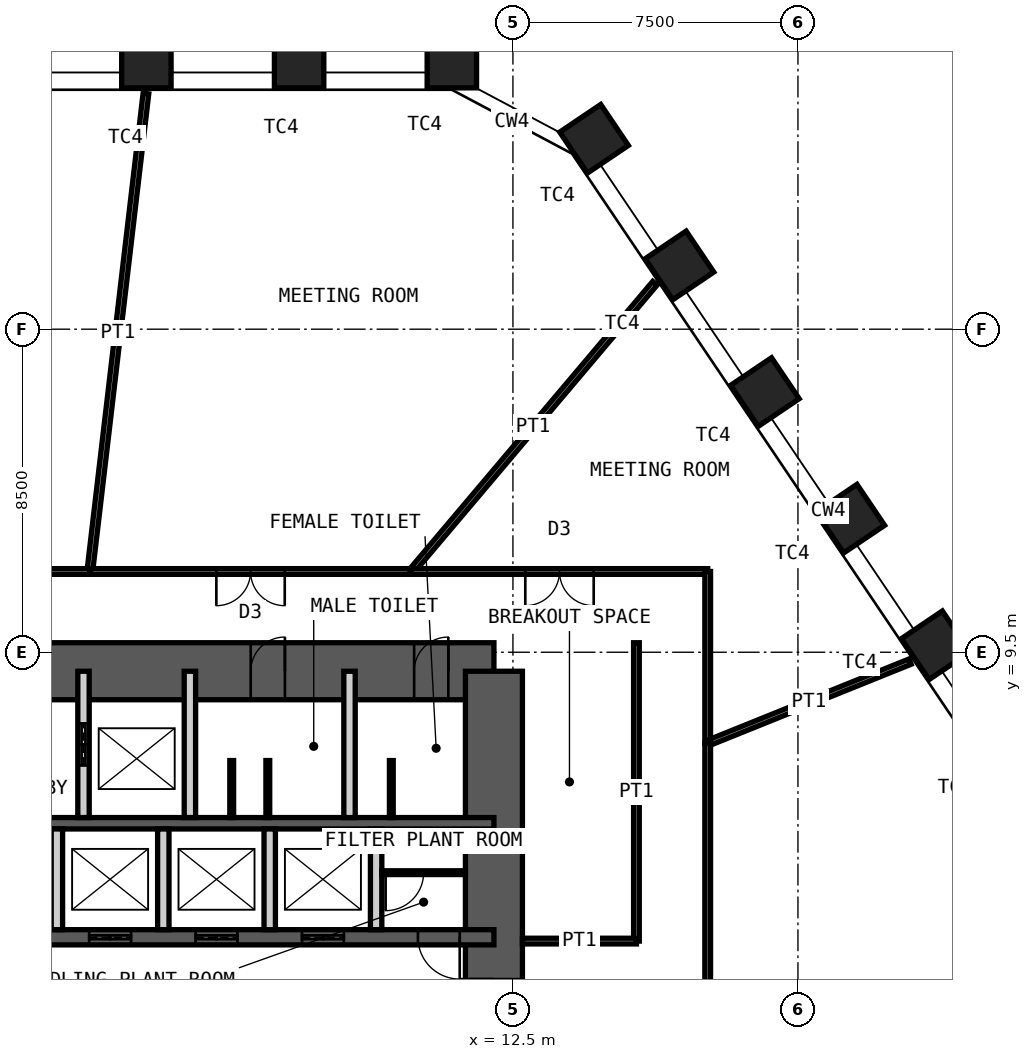
"""IFC4 building model, lengths in metres.
Left out: names, types, materials, properties, quantities, classifications, styles, units other than length and angle.
Written with IfcOpenShell. Run it as: python <this file> out.ifc"""

import sys

from ifc_helpers import new_model, si_unit, direction, frame, frame_2d, origin, origin_2d, place, context, subcontext, project, spatial, rectangle, hollow_rectangle, extrude, element, fill, save


model = new_model("IFC4")
c1 = context("Model", 3, precision=1e-05, world=origin(), true_north=direction((0.0, 1.0)))
c2 = subcontext(c1, "Body", "Model", "MODEL_VIEW")
j1 = project(units=[si_unit("LENGTHUNIT", "METRE"), si_unit("PLANEANGLEUNIT", "RADIAN")], contexts=[c1])
p1 = place(None, origin())
s1 = spatial("IfcSite", under=j1, at=p1, CompositionType="ELEMENT")
p2 = place(p1, origin())
s2 = spatial("IfcBuilding", under=s1, at=p2, CompositionType="ELEMENT")
p3 = place(p2, frame((0.0, 0.0, 161.8)))
s3 = spatial("IfcBuildingStorey", under=s2, at=p3, CompositionType="ELEMENT", Elevation=161.8)
for number, where, z_axis, x_axis in (
    (1, (2.854, 25.0, 0.0), (0.0, 0.0, 1.0), (-1.0, 0.0, 0.0)),
    (2, (6.874, 25.0, 0.0), (0.0, 0.0, 1.0), (-1.0, 0.0, 0.0)),
    (3, (10.893, 25.0, 0.0), (0.0, 0.0, 1.0), (-1.0, 0.0, 0.0)),
    (4, (14.635, 23.01, 0.0), (0.0, 0.0, 1.0), (-0.559, 0.829, 0.0)),
    (5, (16.882, 19.678, 0.0), (0.0, 0.0, 1.0), (-0.559, 0.829, 0.0)),
    (6, (19.13, 16.346, 0.0), (0.0, 0.0, 1.0), (-0.559, 0.829, 0.0)),
    (7, (21.377, 13.014, 0.0), (0.0, 0.0, 1.0), (-0.559, 0.829, 0.0)),
    (8, (23.625, 9.682, 0.0), (0.0, 0.0, 1.0), (-0.559, 0.829, 0.0)),
):
    element("IfcColumn", number, at=place(p3, frame(where, z_axis=z_axis, x_axis=x_axis)), inside=s3, PredefinedType="COLUMN", context=c2, shape_type="SweptSolid", body=[
        extrude(hollow_rectangle(XDim=1.3, YDim=1.3, WallThickness=0.1, at=origin_2d()), origin(), (0.0, 0.0, 1.0), 4.2),
    ])
p4 = place(p3, frame((-12.0, 9.0, 0.0), z_axis=(0.0, 0.0, 1.0), x_axis=(1.0, 0.0, 0.0)))
e9 = element("IfcWall", 9, at=p4, inside=s3, PredefinedType="SHEAR", context=c2, shape_type="SweptSolid", body=[
    extrude(rectangle(XDim=24.0, YDim=1.5, at=frame_2d((12.0, 0.0))), origin(), (0.0, 0.0, 1.0), 4.2),
])
p5 = place(p4, frame((10.4, 0.0, 0.0)))
e10 = element("IfcOpeningElement", 10, at=p5, cuts=e9, PredefinedType="OPENING", context=c2, shape_type="SweptSolid", body=[
    extrude(rectangle(XDim=1.0, YDim=2.1, at=frame_2d((0.5, 1.05))), frame((0.0, 0.76, 0.0), z_axis=(0.0, -1.0, 0.0), x_axis=(1.0, 0.0, 0.0)), (0.0, 0.0, 1.0), 1.52),
])
p6 = place(p4, frame((17.6, 0.0, 0.0)))
e11 = element("IfcOpeningElement", 11, at=p6, cuts=e9, PredefinedType="OPENING", context=c2, shape_type="SweptSolid", body=[
    extrude(rectangle(XDim=0.9, YDim=2.1, at=frame_2d((0.45, 1.05))), frame((0.0, 0.76, 0.0), z_axis=(0.0, -1.0, 0.0), x_axis=(1.0, 0.0, 0.0)), (0.0, 0.0, 1.0), 1.52),
])
p7 = place(p4, frame((21.9, 0.0, 0.0)))
e12 = element("IfcOpeningElement", 12, at=p7, cuts=e9, PredefinedType="OPENING", context=c2, shape_type="SweptSolid", body=[
    extrude(rectangle(XDim=0.9, YDim=2.1, at=frame_2d((0.45, 1.05))), frame((0.0, 0.76, 0.0), z_axis=(0.0, -1.0, 0.0), x_axis=(1.0, 0.0, 0.0)), (0.0, 0.0, 1.0), 1.52),
])
p8 = place(p3, frame((12.0, -9.0, 0.0), z_axis=(0.0, 0.0, 1.0), x_axis=(0.0, 1.0, 0.0)))
e13 = element("IfcWall", 13, at=p8, inside=s3, PredefinedType="SHEAR", context=c2, shape_type="SweptSolid", body=[
    extrude(rectangle(XDim=18.0, YDim=1.5, at=frame_2d((9.0, 0.0))), origin(), (0.0, 0.0, 1.0), 4.2),
])
p9 = place(p8, frame((8.1, 0.0, 0.0)))
e14 = element("IfcOpeningElement", 14, at=p9, cuts=e13, PredefinedType="OPENING", context=c2, shape_type="SweptSolid", body=[
    extrude(rectangle(XDim=1.8, YDim=2.1, at=frame_2d((0.9, 1.05))), frame((0.0, 0.76, 0.0), z_axis=(0.0, -1.0, 0.0), x_axis=(1.0, 0.0, 0.0)), (0.0, 0.0, 1.0), 1.52),
])
p10 = place(p3, frame((-12.0, 5.0, 0.0), z_axis=(0.0, 0.0, 1.0), x_axis=(1.0, 0.0, 0.0)))
e15 = element("IfcWall", 15, at=p10, inside=s3, PredefinedType="SHEAR", context=c2, shape_type="SweptSolid", body=[
    extrude(rectangle(XDim=24.0, YDim=0.3, at=frame_2d((12.0, 0.0))), origin(), (0.0, 0.0, 1.0), 4.2),
])
p11 = place(p3, frame((-12.0, 2.0, 0.0), z_axis=(0.0, 0.0, 1.0), x_axis=(1.0, 0.0, 0.0)))
e16 = element("IfcWall", 16, at=p11, inside=s3, PredefinedType="SHEAR", context=c2, shape_type="SweptSolid", body=[
    extrude(rectangle(XDim=24.0, YDim=0.4, at=frame_2d((12.0, 0.0))), origin(), (0.0, 0.0, 1.0), 4.2),
])
p12 = place(p11, frame((2.4, 0.0, 0.0)))
e17 = element("IfcOpeningElement", 17, at=p12, cuts=e16, PredefinedType="OPENING", context=c2, shape_type="SweptSolid", body=[
    extrude(rectangle(XDim=1.1, YDim=2.1, at=frame_2d((0.55, 1.05))), frame((0.0, 0.21, 0.0), z_axis=(0.0, -1.0, 0.0), x_axis=(1.0, 0.0, 0.0)), (0.0, 0.0, 1.0), 0.42),
])
p13 = place(p11, frame((22.0, 0.0, 0.0)))
e18 = element("IfcOpeningElement", 18, at=p13, cuts=e16, PredefinedType="OPENING", context=c2, shape_type="SweptSolid", body=[
    extrude(rectangle(XDim=1.1, YDim=2.1, at=frame_2d((0.55, 1.05))), frame((0.0, 0.21, 0.0), z_axis=(0.0, -1.0, 0.0), x_axis=(1.0, 0.0, 0.0)), (0.0, 0.0, 1.0), 0.42),
])
p14 = place(p11, frame((10.15, 0.0, 0.0)))
e19 = element("IfcOpeningElement", 19, at=p14, cuts=e16, PredefinedType="OPENING", context=c2, shape_type="SweptSolid", body=[
    extrude(rectangle(XDim=1.0, YDim=2.1, at=frame_2d((0.5, 1.05))), frame((0.0, 0.21, 0.0), z_axis=(0.0, -1.0, 0.0), x_axis=(1.0, 0.0, 0.0)), (0.0, 0.0, 1.0), 0.42),
])
p15 = place(p11, frame((6.9, 0.0, 0.0)))
e20 = element("IfcOpeningElement", 20, at=p15, cuts=e16, PredefinedType="OPENING", context=c2, shape_type="SweptSolid", body=[
    extrude(rectangle(XDim=1.0, YDim=2.1, at=frame_2d((0.5, 1.05))), frame((0.0, 0.21, 0.0), z_axis=(0.0, -1.0, 0.0), x_axis=(1.0, 0.0, 0.0)), (0.0, 0.0, 1.0), 0.42),
])
p16 = place(p11, frame((13.35, 0.0, 0.0)))
e21 = element("IfcOpeningElement", 21, at=p16, cuts=e16, PredefinedType="OPENING", context=c2, shape_type="SweptSolid", body=[
    extrude(rectangle(XDim=1.1, YDim=2.4, at=frame_2d((0.55, 1.2))), frame((0.0, 0.21, 0.0), z_axis=(0.0, -1.0, 0.0), x_axis=(1.0, 0.0, 0.0)), (0.0, 0.0, 1.0), 0.42),
])
p17 = place(p11, frame((16.15, 0.0, 0.0)))
e22 = element("IfcOpeningElement", 22, at=p17, cuts=e16, PredefinedType="OPENING", context=c2, shape_type="SweptSolid", body=[
    extrude(rectangle(XDim=1.1, YDim=2.4, at=frame_2d((0.55, 1.2))), frame((0.0, 0.21, 0.0), z_axis=(0.0, -1.0, 0.0), x_axis=(1.0, 0.0, 0.0)), (0.0, 0.0, 1.0), 0.42),
])
p18 = place(p11, frame((18.95, 0.0, 0.0)))
e23 = element("IfcOpeningElement", 23, at=p18, cuts=e16, PredefinedType="OPENING", context=c2, shape_type="SweptSolid", body=[
    extrude(rectangle(XDim=1.1, YDim=2.4, at=frame_2d((0.55, 1.2))), frame((0.0, 0.21, 0.0), z_axis=(0.0, -1.0, 0.0), x_axis=(1.0, 0.0, 0.0)), (0.0, 0.0, 1.0), 0.42),
])
p19 = place(p3, frame((1.2, 5.15, 0.0), z_axis=(0.0, 0.0, 1.0), x_axis=(0.0, 1.0, 0.0)))
e24 = element("IfcWall", 24, at=p19, inside=s3, PredefinedType="PARTITIONING", context=c2, shape_type="SweptSolid", body=[
    extrude(rectangle(XDim=3.85, YDim=0.3, at=frame_2d((1.925, 0.0))), origin(), (0.0, 0.0, 1.0), 3.98),
])
p20 = place(p19, frame((1.375, 0.0, 0.0)))
e25 = element("IfcOpeningElement", 25, at=p20, cuts=e24, PredefinedType="OPENING", context=c2, shape_type="SweptSolid", body=[
    extrude(rectangle(XDim=1.1, YDim=2.4, at=frame_2d((0.55, 1.2))), frame((0.0, 0.16, 0.0), z_axis=(0.0, -1.0, 0.0), x_axis=(1.0, 0.0, 0.0)), (0.0, 0.0, 1.0), 0.32),
])
for number, where, z_axis, x_axis in (
    (26, (4.0, 5.15, 0.0), (0.0, 0.0, 1.0), (0.0, 1.0, 0.0)),
    (27, (8.2, 5.15, 0.0), (0.0, 0.0, 1.0), (0.0, 1.0, 0.0)),
):
    element("IfcWall", number, at=place(p3, frame(where, z_axis=z_axis, x_axis=x_axis)), inside=s3, PredefinedType="PARTITIONING", context=c2, shape_type="SweptSolid", body=[
        extrude(rectangle(XDim=3.85, YDim=0.3, at=frame_2d((1.925, 0.0))), origin(), (0.0, 0.0, 1.0), 3.98),
    ])
for number, where, z_axis, x_axis in (
    (28, (0.5, 2.2, 0.0), (0.0, 0.0, 1.0), (0.0, 1.0, 0.0)),
    (29, (3.3, 2.2, 0.0), (0.0, 0.0, 1.0), (0.0, 1.0, 0.0)),
    (30, (6.1, 2.2, 0.0), (0.0, 0.0, 1.0), (0.0, 1.0, 0.0)),
    (31, (8.9, 2.2, 0.0), (0.0, 0.0, 1.0), (0.0, 1.0, 0.0)),
):
    element("IfcWall", number, at=place(p3, frame(where, z_axis=z_axis, x_axis=x_axis)), inside=s3, PredefinedType="PARTITIONING", context=c2, shape_type="SweptSolid", body=[
        extrude(rectangle(XDim=2.65, YDim=0.3, at=frame_2d((1.325, 0.0))), origin(), (0.0, 0.0, 1.0), 3.98),
    ])
p21 = place(p3, frame((9.05, 3.7, 0.0), z_axis=(0.0, 0.0, 1.0), x_axis=(1.0, 0.0, 0.0)))
e32 = element("IfcWall", 32, at=p21, inside=s3, PredefinedType="PARTITIONING", context=c2, shape_type="SweptSolid", body=[
    extrude(rectangle(XDim=2.2, YDim=0.1, at=frame_2d((1.1, 0.0))), origin(), (0.0, 0.0, 1.0), 3.98),
])
p22 = place(p21, frame((0.1, 0.0, 0.0)))
e33 = element("IfcOpeningElement", 33, at=p22, cuts=e32, PredefinedType="OPENING", context=c2, shape_type="SweptSolid", body=[
    extrude(rectangle(XDim=1.0, YDim=2.4, at=frame_2d((0.5, 1.2))), frame((0.0, 0.06, 0.0), z_axis=(0.0, -1.0, 0.0), x_axis=(1.0, 0.0, 0.0)), (0.0, 0.0, 1.0), 0.12),
])
for number, where, z_axis, x_axis in (
    (34, (5.1, 5.15, 0.0), (0.0, 0.0, 1.0), (0.0, 1.0, 0.0)),
    (35, (6.05, 5.15, 0.0), (0.0, 0.0, 1.0), (0.0, 1.0, 0.0)),
    (36, (9.3, 5.15, 0.0), (0.0, 0.0, 1.0), (0.0, 1.0, 0.0)),
):
    element("IfcWall", number, at=place(p3, frame(where, z_axis=z_axis, x_axis=x_axis)), inside=s3, PredefinedType="PARTITIONING", context=c2, shape_type="SweptSolid", body=[
        extrude(rectangle(XDim=1.5, YDim=0.1, at=frame_2d((0.75, 0.0))), origin(), (0.0, 0.0, 1.0), 2.1),
    ])
p23 = place(p3, frame((2.843, 24.201, 0.0), z_axis=(0.0, 0.0, 1.0), x_axis=(-0.116670084723, -0.993170726175, 0.0)))
e37 = element("IfcWall", 37, at=p23, inside=s3, PredefinedType="PARTITIONING", context=c2, shape_type="SweptSolid", body=[
    extrude(rectangle(XDim=12.662, YDim=0.15, at=frame_2d((6.331, 0.0))), origin(), (0.0, 0.0, 1.0), 3.28),
])
p24 = place(p3, frame((1.366, 11.625, 0.0), z_axis=(0.0, 0.0, 1.0), x_axis=(1.0, 0.0, 0.0)))
e38 = element("IfcWall", 38, at=p24, inside=s3, PredefinedType="PARTITIONING", context=c2, shape_type="SweptSolid", body=[
    extrude(rectangle(XDim=8.46, YDim=0.15, at=frame_2d((4.23, 0.0))), origin(), (0.0, 0.0, 1.0), 4.03),
])
p25 = place(p24, frame((3.33, 0.0, 0.0)))
e39 = element("IfcOpeningElement", 39, at=p25, cuts=e38, PredefinedType="OPENING", context=c2, shape_type="SweptSolid", body=[
    extrude(rectangle(XDim=1.8, YDim=2.4, at=frame_2d((0.9, 1.2))), frame((0.0, 0.085, 0.0), z_axis=(0.0, -1.0, 0.0), x_axis=(1.0, 0.0, 0.0)), (0.0, 0.0, 1.0), 0.17),
])
p26 = place(p3, frame((16.237, 19.21, 0.0), z_axis=(0.0, 0.0, 1.0), x_axis=(-0.645526723652, -0.763737683404, 0.0)))
e40 = element("IfcWall", 40, at=p26, inside=s3, PredefinedType="PARTITIONING", context=c2, shape_type="SweptSolid", body=[
    extrude(rectangle(XDim=9.932, YDim=0.15, at=frame_2d((4.966, 0.0))), origin(), (0.0, 0.0, 1.0), 3.28),
])
p27 = place(p3, frame((9.826, 11.625, 0.0), z_axis=(0.0, 0.0, 1.0), x_axis=(1.0, 0.0, 0.0)))
e41 = element("IfcWall", 41, at=p27, inside=s3, PredefinedType="PARTITIONING", context=c2, shape_type="SweptSolid", body=[
    extrude(rectangle(XDim=7.799, YDim=0.15, at=frame_2d((3.899, 0.0))), origin(), (0.0, 0.0, 1.0), 4.03),
])
p28 = place(p27, frame((3.0, 0.0, 0.0)))
e42 = element("IfcOpeningElement", 42, at=p28, cuts=e41, PredefinedType="OPENING", context=c2, shape_type="SweptSolid", body=[
    extrude(rectangle(XDim=1.8, YDim=2.4, at=frame_2d((0.9, 1.2))), frame((0.0, 0.085, 0.0), z_axis=(0.0, -1.0, 0.0), x_axis=(1.0, 0.0, 0.0)), (0.0, 0.0, 1.0), 0.17),
])
p29 = place(p3, frame((17.625, 11.625, 0.0), z_axis=(0.0, 0.0, 1.0), x_axis=(0.0, -1.0, 0.0)))
e43 = element("IfcWall", 43, at=p29, inside=s3, PredefinedType="PARTITIONING", context=c2, shape_type="SweptSolid", body=[
    extrude(rectangle(XDim=4.519, YDim=0.15, at=frame_2d((2.26, 0.0))), origin(), (0.0, 0.0, 1.0), 4.03),
])
p30 = place(p3, frame((22.951, 9.254, 0.0), z_axis=(0.0, 0.0, 1.0), x_axis=(-0.927444087873, -0.373961848147, 0.0)))
e44 = element("IfcWall", 44, at=p30, inside=s3, PredefinedType="PARTITIONING", context=c2, shape_type="SweptSolid", body=[
    extrude(rectangle(XDim=5.743, YDim=0.15, at=frame_2d((2.872, 0.0))), origin(), (0.0, 0.0, 1.0), 3.28),
])
p31 = place(p3, frame((17.625, 7.106, 0.0), z_axis=(0.0, 0.0, 1.0), x_axis=(0.0, -1.0, 0.0)))
e45 = element("IfcWall", 45, at=p31, inside=s3, PredefinedType="PARTITIONING", context=c2, shape_type="SweptSolid", body=[
    extrude(rectangle(XDim=18.731, YDim=0.15, at=frame_2d((9.365, 0.0))), origin(), (0.0, 0.0, 1.0), 4.03),
])
p32 = place(p31, frame((8.466, 0.0, 0.0)))
e46 = element("IfcOpeningElement", 46, at=p32, cuts=e45, PredefinedType="OPENING", context=c2, shape_type="SweptSolid", body=[
    extrude(rectangle(XDim=1.8, YDim=2.4, at=frame_2d((0.9, 1.2))), frame((0.0, 0.085, 0.0), z_axis=(0.0, -1.0, 0.0), x_axis=(1.0, 0.0, 0.0)), (0.0, 0.0, 1.0), 0.17),
])
p33 = place(p3, frame((-4.403, 11.625, 0.0), z_axis=(0.0, 0.0, 1.0), x_axis=(1.0, 0.0, 0.0)))
e47 = element("IfcWall", 47, at=p33, inside=s3, PredefinedType="PARTITIONING", context=c2, shape_type="SweptSolid", body=[
    extrude(rectangle(XDim=5.768, YDim=0.15, at=frame_2d((2.884, 0.0))), origin(), (0.0, 0.0, 1.0), 4.03),
])
p34 = place(p33, frame((1.984, 0.0, 0.0)))
e48 = element("IfcOpeningElement", 48, at=p34, cuts=e47, PredefinedType="OPENING", context=c2, shape_type="SweptSolid", body=[
    extrude(rectangle(XDim=1.8, YDim=2.4, at=frame_2d((0.9, 1.2))), frame((0.0, 0.085, 0.0), z_axis=(0.0, -1.0, 0.0), x_axis=(1.0, 0.0, 0.0)), (0.0, 0.0, 1.0), 0.17),
])
p35 = place(p3, frame((15.75, 1.9, 0.0), z_axis=(0.0, 0.0, 1.0), x_axis=(0.0, 1.0, 0.0)))
e49 = element("IfcWall", 49, at=p35, inside=s3, PredefinedType="PARTITIONING", context=c2, shape_type="SweptSolid", body=[
    extrude(rectangle(XDim=7.85, YDim=0.15, at=frame_2d((3.925, 0.0))), origin(), (0.0, 0.0, 1.0), 4.03),
])
p36 = place(p3, frame((12.75, 1.9, 0.0), z_axis=(0.0, 0.0, 1.0), x_axis=(1.0, 0.0, 0.0)))
e50 = element("IfcWall", 50, at=p36, inside=s3, PredefinedType="PARTITIONING", context=c2, shape_type="SweptSolid", body=[
    extrude(rectangle(XDim=3.0, YDim=0.15, at=frame_2d((1.5, 0.0))), origin(), (0.0, 0.0, 1.0), 2.93),
])
p37 = place(p6, origin())
e51 = element("IfcDoor", 51, at=p37, inside=s3, OperationType="SINGLE_SWING_LEFT", PredefinedType="DOOR", context=c2, shape_type="SweptSolid", body=[
    extrude(rectangle(XDim=0.9, YDim=2.1, at=frame_2d((0.45, 1.05))), frame((0.0, 0.025, 0.0), z_axis=(0.0, -1.0, 0.0), x_axis=(1.0, 0.0, 0.0)), (0.0, 0.0, 1.0), 0.05),
])
fill(e11, e51)
p38 = place(p7, origin())
e52 = element("IfcDoor", 52, at=p38, inside=s3, OperationType="SINGLE_SWING_LEFT", PredefinedType="DOOR", context=c2, shape_type="SweptSolid", body=[
    extrude(rectangle(XDim=0.9, YDim=2.1, at=frame_2d((0.45, 1.05))), frame((0.0, 0.025, 0.0), z_axis=(0.0, -1.0, 0.0), x_axis=(1.0, 0.0, 0.0)), (0.0, 0.0, 1.0), 0.05),
])
fill(e12, e52)
p39 = place(p13, origin())
e53 = element("IfcDoor", 53, at=p39, inside=s3, OperationType="SINGLE_SWING_RIGHT", PredefinedType="DOOR", context=c2, shape_type="SweptSolid", body=[
    extrude(rectangle(XDim=1.1, YDim=2.1, at=frame_2d((0.55, 1.05))), frame((0.0, 0.025, 0.0), z_axis=(0.0, -1.0, 0.0), x_axis=(1.0, 0.0, 0.0)), (0.0, 0.0, 1.0), 0.05),
])
fill(e18, e53)
p40 = place(p9, origin())
e54 = element("IfcDoor", 54, at=p40, inside=s3, OperationType="DOUBLE_DOOR_DOUBLE_SWING", PredefinedType="DOOR", context=c2, shape_type="SweptSolid", body=[
    extrude(rectangle(XDim=1.8, YDim=2.1, at=frame_2d((0.9, 1.05))), frame((0.0, 0.025, 0.0), z_axis=(0.0, -1.0, 0.0), x_axis=(1.0, 0.0, 0.0)), (0.0, 0.0, 1.0), 0.05),
])
fill(e14, e54)
p41 = place(p20, origin())
e55 = element("IfcDoor", 55, at=p41, inside=s3, OperationType="DOUBLE_DOOR_SLIDING", PredefinedType="DOOR", context=c2, shape_type="SweptSolid", body=[
    extrude(rectangle(XDim=1.1, YDim=2.4, at=frame_2d((0.55, 1.2))), frame((0.0, 0.025, 0.0), z_axis=(0.0, -1.0, 0.0), x_axis=(1.0, 0.0, 0.0)), (0.0, 0.0, 1.0), 0.05),
])
fill(e25, e55)
p42 = place(p16, origin())
e56 = element("IfcDoor", 56, at=p42, inside=s3, OperationType="DOUBLE_DOOR_SLIDING", PredefinedType="DOOR", context=c2, shape_type="SweptSolid", body=[
    extrude(rectangle(XDim=1.1, YDim=2.4, at=frame_2d((0.55, 1.2))), frame((0.0, 0.025, 0.0), z_axis=(0.0, -1.0, 0.0), x_axis=(1.0, 0.0, 0.0)), (0.0, 0.0, 1.0), 0.05),
])
fill(e21, e56)
p43 = place(p17, origin())
e57 = element("IfcDoor", 57, at=p43, inside=s3, OperationType="DOUBLE_DOOR_SLIDING", PredefinedType="DOOR", context=c2, shape_type="SweptSolid", body=[
    extrude(rectangle(XDim=1.1, YDim=2.4, at=frame_2d((0.55, 1.2))), frame((0.0, 0.025, 0.0), z_axis=(0.0, -1.0, 0.0), x_axis=(1.0, 0.0, 0.0)), (0.0, 0.0, 1.0), 0.05),
])
fill(e22, e57)
p44 = place(p18, origin())
e58 = element("IfcDoor", 58, at=p44, inside=s3, OperationType="DOUBLE_DOOR_SLIDING", PredefinedType="DOOR", context=c2, shape_type="SweptSolid", body=[
    extrude(rectangle(XDim=1.1, YDim=2.4, at=frame_2d((0.55, 1.2))), frame((0.0, 0.025, 0.0), z_axis=(0.0, -1.0, 0.0), x_axis=(1.0, 0.0, 0.0)), (0.0, 0.0, 1.0), 0.05),
])
fill(e23, e58)
p45 = place(p22, origin())
e59 = element("IfcDoor", 59, at=p45, inside=s3, OperationType="SINGLE_SWING_LEFT", PredefinedType="DOOR", context=c2, shape_type="SweptSolid", body=[
    extrude(rectangle(XDim=1.0, YDim=2.4, at=frame_2d((0.5, 1.2))), frame((0.0, 0.025, 0.0), z_axis=(0.0, -1.0, 0.0), x_axis=(1.0, 0.0, 0.0)), (0.0, 0.0, 1.0), 0.05),
])
fill(e33, e59)
p46 = place(p25, origin())
e60 = element("IfcDoor", 60, at=p46, inside=s3, OperationType="DOUBLE_DOOR_DOUBLE_SWING", PredefinedType="DOOR", context=c2, shape_type="SweptSolid", body=[
    extrude(rectangle(XDim=1.8, YDim=2.4, at=frame_2d((0.9, 1.2))), frame((0.0, 0.025, 0.0), z_axis=(0.0, -1.0, 0.0), x_axis=(1.0, 0.0, 0.0)), (0.0, 0.0, 1.0), 0.05),
])
fill(e39, e60)
p47 = place(p28, origin())
e61 = element("IfcDoor", 61, at=p47, inside=s3, OperationType="DOUBLE_DOOR_DOUBLE_SWING", PredefinedType="DOOR", context=c2, shape_type="SweptSolid", body=[
    extrude(rectangle(XDim=1.8, YDim=2.4, at=frame_2d((0.9, 1.2))), frame((0.0, 0.025, 0.0), z_axis=(0.0, -1.0, 0.0), x_axis=(1.0, 0.0, 0.0)), (0.0, 0.0, 1.0), 0.05),
])
fill(e42, e61)
save(model, sys.argv[1])
